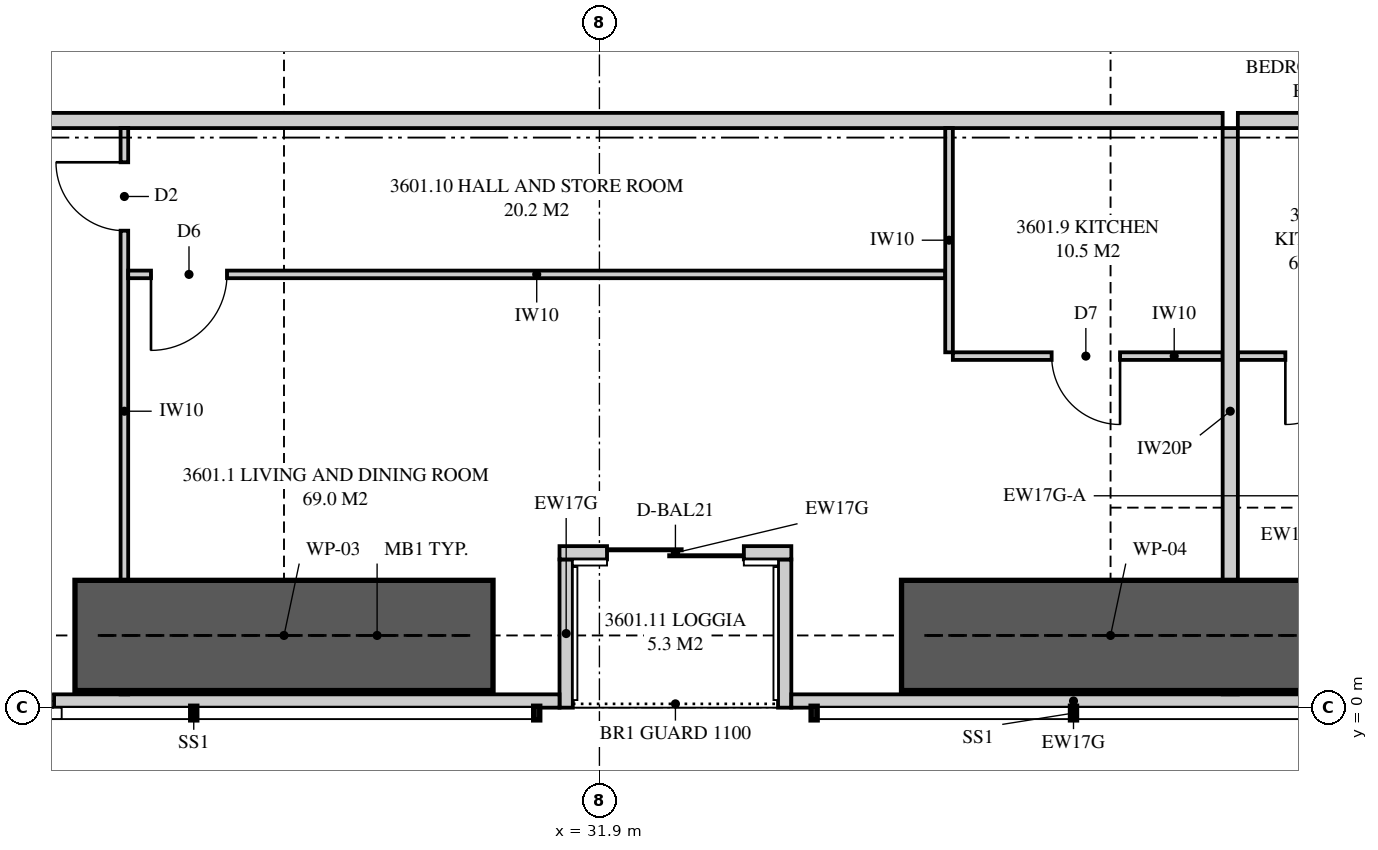
"""IFC4 building model, lengths in metres.
Left out: names, types, materials, properties, quantities, classifications, styles, units other than length and angle.
Written with IfcOpenShell. Run it as: python <this file> out.ifc"""

import sys

from ifc_helpers import new_model, si_unit, direction, frame, frame_2d, origin, place, context, subcontext, project, spatial, polyline, rectangle, outline, extrude, element, fill, save


model = new_model("IFC4")
c1 = context("Model", 3, precision=1e-05, world=origin(), true_north=direction((0.0, 1.0)))
c2 = subcontext(c1, "Body", "Model", "MODEL_VIEW")
j1 = project(units=[si_unit("LENGTHUNIT", "METRE"), si_unit("PLANEANGLEUNIT", "RADIAN")], contexts=[c1])
p1 = place(None, origin())
s1 = spatial("IfcSite", under=j1, at=p1, CompositionType="ELEMENT")
p2 = place(p1, origin())
s2 = spatial("IfcBuilding", under=s1, at=p2, CompositionType="ELEMENT")
p3 = place(p2, frame((0.0, 0.0, 131.65)))
s3 = spatial("IfcBuildingStorey", under=s2, at=p3, CompositionType="ELEMENT", Elevation=131.65)
p4 = place(p3, frame((9.051, 0.087, 0.0), z_axis=(0.0, 0.0, 1.0), x_axis=(1.0, 0.0, 0.0)))
e1 = element("IfcWall", 1, at=p4, inside=s3, PredefinedType="SOLIDWALL", context=c2, shape_type="SweptSolid", body=[
    extrude(outline(polyline([(0.0, 0.0), (22.324, 0.0), (22.324, 2.15), (7.824, 2.15), (7.824, 3.11), (7.666, 3.11), (7.666, 2.15), (7.62, 2.15), (7.62, 3.11), (0.0, 3.11), (0.0, 0.0)])), frame((0.0, 0.087, 0.0), z_axis=(0.0, -1.0, 0.0), x_axis=(1.0, 0.0, 0.0)), (0.0, 0.0, 1.0), 0.175),
])
p5 = place(p4, frame((3.134, 0.0, 0.4)))
e2 = element("IfcOpeningElement", 2, at=p5, cuts=e1, PredefinedType="OPENING", context=c2, shape_type="SweptSolid", body=[
    extrude(rectangle(XDim=1.8, YDim=1.7, at=frame_2d((0.9, 0.85))), frame((0.0, 0.097, 0.0), z_axis=(0.0, -1.0, 0.0), x_axis=(1.0, 0.0, 0.0)), (0.0, 0.0, 1.0), 0.195),
])
p6 = place(p4, frame((10.706, 0.0, 0.4)))
e3 = element("IfcOpeningElement", 3, at=p6, cuts=e1, PredefinedType="OPENING", context=c2, shape_type="SweptSolid", body=[
    extrude(rectangle(XDim=1.8, YDim=1.7, at=frame_2d((0.9, 0.85))), frame((0.0, 0.097, 0.0), z_axis=(0.0, -1.0, 0.0), x_axis=(1.0, 0.0, 0.0)), (0.0, 0.0, 1.0), 0.195),
])
p7 = place(p4, frame((13.874, 0.0, 0.4)))
e4 = element("IfcOpeningElement", 4, at=p7, cuts=e1, PredefinedType="OPENING", context=c2, shape_type="SweptSolid", body=[
    extrude(rectangle(XDim=1.8, YDim=1.7, at=frame_2d((0.9, 0.85))), frame((0.0, 0.097, 0.0), z_axis=(0.0, -1.0, 0.0), x_axis=(1.0, 0.0, 0.0)), (0.0, 0.0, 1.0), 0.195),
])
p8 = place(p3, frame((34.425, 0.087, 0.0), z_axis=(0.0, 0.0, 1.0), x_axis=(1.0, 0.0, 0.0)))
e5 = element("IfcWall", 5, at=p8, inside=s3, PredefinedType="SOLIDWALL", context=c2, shape_type="SweptSolid", body=[
    extrude(outline(polyline([(0.0, 0.0), (7.425, 0.0), (7.425, 3.11), (4.403, 3.11), (4.403, 2.15), (4.358, 2.15), (4.358, 3.11), (4.2, 3.11), (4.2, 2.15), (0.0, 2.15), (0.0, 0.0)])), frame((0.0, 0.087, 0.0), z_axis=(0.0, -1.0, 0.0), x_axis=(1.0, 0.0, 0.0)), (0.0, 0.0, 1.0), 0.175),
])
p9 = place(p3, frame((31.375, 2.038, 0.0), z_axis=(0.0, 0.0, 1.0), x_axis=(1.0, 0.0, 0.0)))
e6 = element("IfcWall", 6, at=p9, inside=s3, PredefinedType="SOLIDWALL", context=c2, shape_type="SweptSolid", body=[
    extrude(rectangle(XDim=3.05, YDim=0.175, at=frame_2d((1.525, 0.0))), origin(), (0.0, 0.0, 1.0), 3.11),
])
p10 = place(p9, frame((0.625, 0.0, 0.0)))
e7 = element("IfcOpeningElement", 7, at=p10, cuts=e6, PredefinedType="OPENING", context=c2, shape_type="SweptSolid", body=[
    extrude(rectangle(XDim=1.8, YDim=2.1, at=frame_2d((0.9, 1.05))), frame((0.0, 0.097, 0.0), z_axis=(0.0, -1.0, 0.0), x_axis=(1.0, 0.0, 0.0)), (0.0, 0.0, 1.0), 0.195),
])
for number, where, z_axis, x_axis in (
    (8, (31.462, 0.0, 0.0), (0.0, 0.0, 1.0), (0.0, 1.0, 0.0)),
    (9, (34.337, 0.0, 0.0), (0.0, 0.0, 1.0), (0.0, 1.0, 0.0)),
):
    element("IfcWall", number, at=place(p3, frame(where, z_axis=z_axis, x_axis=x_axis)), inside=s3, PredefinedType="SOLIDWALL", context=c2, shape_type="SweptSolid", body=[
        extrude(outline(polyline([(0.0, 0.0), (1.95, 0.0), (1.95, 3.11), (1.75, 3.11), (1.75, 2.15), (0.15, 2.15), (0.15, 3.11), (0.0, 3.11), (0.0, 0.0)])), frame((0.0, 0.087, 0.0), z_axis=(0.0, -1.0, 0.0), x_axis=(1.0, 0.0, 0.0)), (0.0, 0.0, 1.0), 0.175),
    ])
p11 = place(p3, frame((40.2, 0.175, 0.0), z_axis=(0.0, 0.0, 1.0), x_axis=(0.0, 1.0, 0.0)))
e10 = element("IfcWall", 10, at=p11, inside=s3, PredefinedType="PARTITIONING", context=c2, shape_type="SweptSolid", body=[
    extrude(outline(polyline([(0.167, 3.11), (0.0, 3.11), (0.0, 0.0), (0.529, 0.0), (0.529, 0.427), (1.021, 0.427), (1.021, 0.0), (7.45, 0.0), (7.45, 3.11), (3.766, 3.11), (3.766, 2.51), (2.025, 2.51), (2.025, 2.15), (1.021, 2.15), (1.021, 1.723), (0.529, 1.723), (0.529, 2.15), (0.167, 2.15), (0.167, 3.11)])), frame((0.0, 0.1, 0.0), z_axis=(0.0, -1.0, 0.0), x_axis=(1.0, 0.0, 0.0)), (0.0, 0.0, 1.0), 0.2),
])
p12 = place(p3, frame((17.775, 7.725, 0.0), z_axis=(0.0, 0.0, 1.0), x_axis=(1.0, 0.0, 0.0)))
e11 = element("IfcWall", 11, at=p12, inside=s3, PredefinedType="PARTITIONING", context=c2, shape_type="SweptSolid", body=[
    extrude(outline(polyline([(0.0, 0.0), (22.325, 0.0), (22.325, 3.11), (21.187, 3.11), (21.187, 2.541), (20.513, 2.541), (20.513, 3.11), (10.312, 3.11), (10.312, 2.541), (9.638, 2.541), (9.638, 3.11), (0.0, 3.11), (0.0, 0.0)])), frame((0.0, 0.1, 0.0), z_axis=(0.0, -1.0, 0.0), x_axis=(1.0, 0.0, 0.0)), (0.0, 0.0, 1.0), 0.2),
])
p13 = place(p12, frame((4.825, 0.0, 0.0)))
e12 = element("IfcOpeningElement", 12, at=p13, cuts=e11, PredefinedType="OPENING", context=c2, shape_type="SweptSolid", body=[
    extrude(rectangle(XDim=1.05, YDim=2.2, at=frame_2d((0.525, 1.1))), frame((0.0, 0.11, 0.0), z_axis=(0.0, -1.0, 0.0), x_axis=(1.0, 0.0, 0.0)), (0.0, 0.0, 1.0), 0.22),
])
p14 = place(p3, frame((25.65, 0.175, 0.0), z_axis=(0.0, 0.0, 1.0), x_axis=(0.0, 1.0, 0.0)))
e13 = element("IfcWall", 13, at=p14, inside=s3, PredefinedType="PARTITIONING", context=c2, shape_type="SweptSolid", body=[
    extrude(outline(polyline([(0.529, 2.15), (0.0, 2.15), (0.0, 0.0), (0.529, 0.0), (0.529, 0.034), (1.021, 0.034), (1.021, 0.0), (7.45, 0.0), (7.45, 3.11), (1.635, 3.11), (1.635, 2.15), (1.021, 2.15), (1.021, 2.116), (0.529, 2.116), (0.529, 2.15)])), frame((0.0, 0.05, 0.0), z_axis=(0.0, -1.0, 0.0), x_axis=(1.0, 0.0, 0.0)), (0.0, 0.0, 1.0), 0.1),
])
p15 = place(p14, frame((6.1, 0.0, 0.0)))
e14 = element("IfcOpeningElement", 14, at=p15, cuts=e13, PredefinedType="OPENING", context=c2, shape_type="SweptSolid", body=[
    extrude(rectangle(XDim=0.9, YDim=2.1, at=frame_2d((0.45, 1.05))), frame((0.0, 0.06, 0.0), z_axis=(0.0, -1.0, 0.0), x_axis=(1.0, 0.0, 0.0)), (0.0, 0.0, 1.0), 0.12),
])
p16 = place(p3, frame((36.55, 4.625, 0.0), z_axis=(0.0, 0.0, 1.0), x_axis=(1.0, 0.0, 0.0)))
e15 = element("IfcWall", 15, at=p16, inside=s3, PredefinedType="PARTITIONING", context=c2, shape_type="SweptSolid", body=[
    extrude(outline(polyline([(0.0, 0.0), (3.55, 0.0), (3.55, 3.11), (2.362, 3.11), (2.362, 2.541), (1.788, 2.541), (1.788, 3.11), (0.0, 3.11), (0.0, 0.0)])), frame((0.0, 0.05, 0.0), z_axis=(0.0, -1.0, 0.0), x_axis=(1.0, 0.0, 0.0)), (0.0, 0.0, 1.0), 0.1),
])
p17 = place(p16, frame((1.3, 0.0, 0.0)))
e16 = element("IfcOpeningElement", 16, at=p17, cuts=e15, PredefinedType="OPENING", context=c2, shape_type="SweptSolid", body=[
    extrude(rectangle(XDim=0.9, YDim=2.1, at=frame_2d((0.45, 1.05))), frame((0.0, 0.06, 0.0), z_axis=(0.0, -1.0, 0.0), x_axis=(1.0, 0.0, 0.0)), (0.0, 0.0, 1.0), 0.12),
])
p18 = place(p3, frame((36.5, 4.675, 0.0), z_axis=(0.0, 0.0, 1.0), x_axis=(0.0, 1.0, 0.0)))
e17 = element("IfcWall", 17, at=p18, inside=s3, PredefinedType="PARTITIONING", context=c2, shape_type="SweptSolid", body=[
    extrude(rectangle(XDim=2.95, YDim=0.1, at=frame_2d((1.475, 0.0))), origin(), (0.0, 0.0, 1.0), 3.11),
])
p19 = place(p3, frame((25.7, 5.7, 0.0), z_axis=(0.0, 0.0, 1.0), x_axis=(1.0, 0.0, 0.0)))
e18 = element("IfcWall", 18, at=p19, inside=s3, PredefinedType="PARTITIONING", context=c2, shape_type="SweptSolid", body=[
    extrude(outline(polyline([(0.0, 0.0), (10.75, 0.0), (10.75, 3.11), (2.337, 3.11), (2.337, 2.541), (1.763, 2.541), (1.763, 3.11), (0.0, 3.11), (0.0, 0.0)])), frame((0.0, 0.05, 0.0), z_axis=(0.0, -1.0, 0.0), x_axis=(1.0, 0.0, 0.0)), (0.0, 0.0, 1.0), 0.1),
])
p20 = place(p19, frame((0.3, 0.0, 0.0)))
e19 = element("IfcOpeningElement", 19, at=p20, cuts=e18, PredefinedType="OPENING", context=c2, shape_type="SweptSolid", body=[
    extrude(rectangle(XDim=1.0, YDim=2.1, at=frame_2d((0.5, 1.05))), frame((0.0, 0.06, 0.0), z_axis=(0.0, -1.0, 0.0), x_axis=(1.0, 0.0, 0.0)), (0.0, 0.0, 1.0), 0.12),
])
p21 = place(p3, frame((40.3, 7.725, 0.0), z_axis=(0.0, 0.0, 1.0), x_axis=(1.0, 0.0, 0.0)))
e20 = element("IfcWall", 20, at=p21, inside=s3, PredefinedType="PARTITIONING", context=c2, shape_type="SweptSolid", body=[
    extrude(rectangle(XDim=5.725, YDim=0.2, at=frame_2d((2.862, 0.0))), origin(), (0.0, 0.0, 1.0), 3.11),
])
p22 = place(p21, frame((4.05, 0.0, 0.0)))
e21 = element("IfcOpeningElement", 21, at=p22, cuts=e20, PredefinedType="OPENING", context=c2, shape_type="SweptSolid", body=[
    extrude(rectangle(XDim=1.05, YDim=2.2, at=frame_2d((0.525, 1.1))), frame((0.0, 0.11, 0.0), z_axis=(0.0, -1.0, 0.0), x_axis=(1.0, 0.0, 0.0)), (0.0, 0.0, 1.0), 0.22),
])
p23 = place(p3, frame((40.3, 4.625, 0.0), z_axis=(0.0, 0.0, 1.0), x_axis=(1.0, 0.0, 0.0)))
e22 = element("IfcWall", 22, at=p23, inside=s3, PredefinedType="PARTITIONING", context=c2, shape_type="SweptSolid", body=[
    extrude(rectangle(XDim=2.075, YDim=0.1, at=frame_2d((1.038, 0.0))), origin(), (0.0, 0.0, 1.0), 3.11),
])
p24 = place(p23, frame((0.625, 0.0, 0.0)))
e23 = element("IfcOpeningElement", 23, at=p24, cuts=e22, PredefinedType="OPENING", context=c2, shape_type="SweptSolid", body=[
    extrude(rectangle(XDim=0.9, YDim=2.1, at=frame_2d((0.45, 1.05))), frame((0.0, 0.06, 0.0), z_axis=(0.0, -1.0, 0.0), x_axis=(1.0, 0.0, 0.0)), (0.0, 0.0, 1.0), 0.12),
])
for number, where, z_axis, x_axis in (
    (24, (25.0, 0.95, 0.0), (0.0, 0.0, 1.0), (1.0, 0.0, 0.0)),
    (25, (35.875, 0.95, 0.0), (0.0, 0.0, 1.0), (1.0, 0.0, 0.0)),
):
    element("IfcWall", number, at=place(p3, frame(where, z_axis=z_axis, x_axis=x_axis)), inside=s3, PredefinedType="SHEAR", context=c2, shape_type="SweptSolid", body=[
        extrude(rectangle(XDim=5.5, YDim=1.45, at=frame_2d((2.75, 0.0))), origin(), (0.0, 0.0, 1.0), 3.35),
    ])
p25 = place(p7, origin())
e26 = element("IfcWindow", 26, at=p25, inside=s3, PartitioningType="SINGLE_PANEL", PredefinedType="WINDOW", context=c2, shape_type="SweptSolid", body=[
    extrude(rectangle(XDim=1.8, YDim=1.7, at=frame_2d((0.9, 0.85))), frame((0.0, 0.03, 0.0), z_axis=(0.0, -1.0, 0.0), x_axis=(1.0, 0.0, 0.0)), (0.0, 0.0, 1.0), 0.06),
])
fill(e4, e26)
p26 = place(p10, origin())
e27 = element("IfcDoor", 27, at=p26, inside=s3, OperationType="SLIDING_TO_LEFT", PredefinedType="DOOR", context=c2, shape_type="SweptSolid", body=[
    extrude(rectangle(XDim=1.8, YDim=2.1, at=frame_2d((0.9, 1.05))), frame((0.0, 0.025, 0.0), z_axis=(0.0, -1.0, 0.0), x_axis=(1.0, 0.0, 0.0)), (0.0, 0.0, 1.0), 0.05),
])
fill(e7, e27)
p27 = place(p15, origin())
e28 = element("IfcDoor", 28, at=p27, inside=s3, OperationType="SINGLE_SWING_RIGHT", PredefinedType="DOOR", context=c2, shape_type="SweptSolid", body=[
    extrude(rectangle(XDim=0.9, YDim=2.1, at=frame_2d((0.45, 1.05))), frame((0.0, 0.025, 0.0), z_axis=(0.0, -1.0, 0.0), x_axis=(1.0, 0.0, 0.0)), (0.0, 0.0, 1.0), 0.05),
])
fill(e14, e28)
p28 = place(p17, frame((0.9, 0.0, 0.0), z_axis=(0.0, 0.0, 1.0), x_axis=(-1.0, 0.0, 0.0)))
e29 = element("IfcDoor", 29, at=p28, inside=s3, OperationType="SINGLE_SWING_LEFT", PredefinedType="DOOR", context=c2, shape_type="SweptSolid", body=[
    extrude(rectangle(XDim=0.9, YDim=2.1, at=frame_2d((0.45, 1.05))), frame((0.0, 0.025, 0.0), z_axis=(0.0, -1.0, 0.0), x_axis=(1.0, 0.0, 0.0)), (0.0, 0.0, 1.0), 0.05),
])
fill(e16, e29)
p29 = place(p20, frame((1.0, 0.0, 0.0), z_axis=(0.0, 0.0, 1.0), x_axis=(-1.0, 0.0, 0.0)))
e30 = element("IfcDoor", 30, at=p29, inside=s3, OperationType="SINGLE_SWING_RIGHT", PredefinedType="DOOR", context=c2, shape_type="SweptSolid", body=[
    extrude(rectangle(XDim=1.0, YDim=2.1, at=frame_2d((0.5, 1.05))), frame((0.0, 0.025, 0.0), z_axis=(0.0, -1.0, 0.0), x_axis=(1.0, 0.0, 0.0)), (0.0, 0.0, 1.0), 0.05),
])
fill(e19, e30)
p30 = place(p24, frame((0.9, 0.0, 0.0), z_axis=(0.0, 0.0, 1.0), x_axis=(-1.0, 0.0, 0.0)))
e31 = element("IfcDoor", 31, at=p30, inside=s3, OperationType="SINGLE_SWING_RIGHT", PredefinedType="DOOR", context=c2, shape_type="SweptSolid", body=[
    extrude(rectangle(XDim=0.9, YDim=2.1, at=frame_2d((0.45, 1.05))), frame((0.0, 0.025, 0.0), z_axis=(0.0, -1.0, 0.0), x_axis=(1.0, 0.0, 0.0)), (0.0, 0.0, 1.0), 0.05),
])
fill(e23, e31)
save(model, sys.argv[1])
